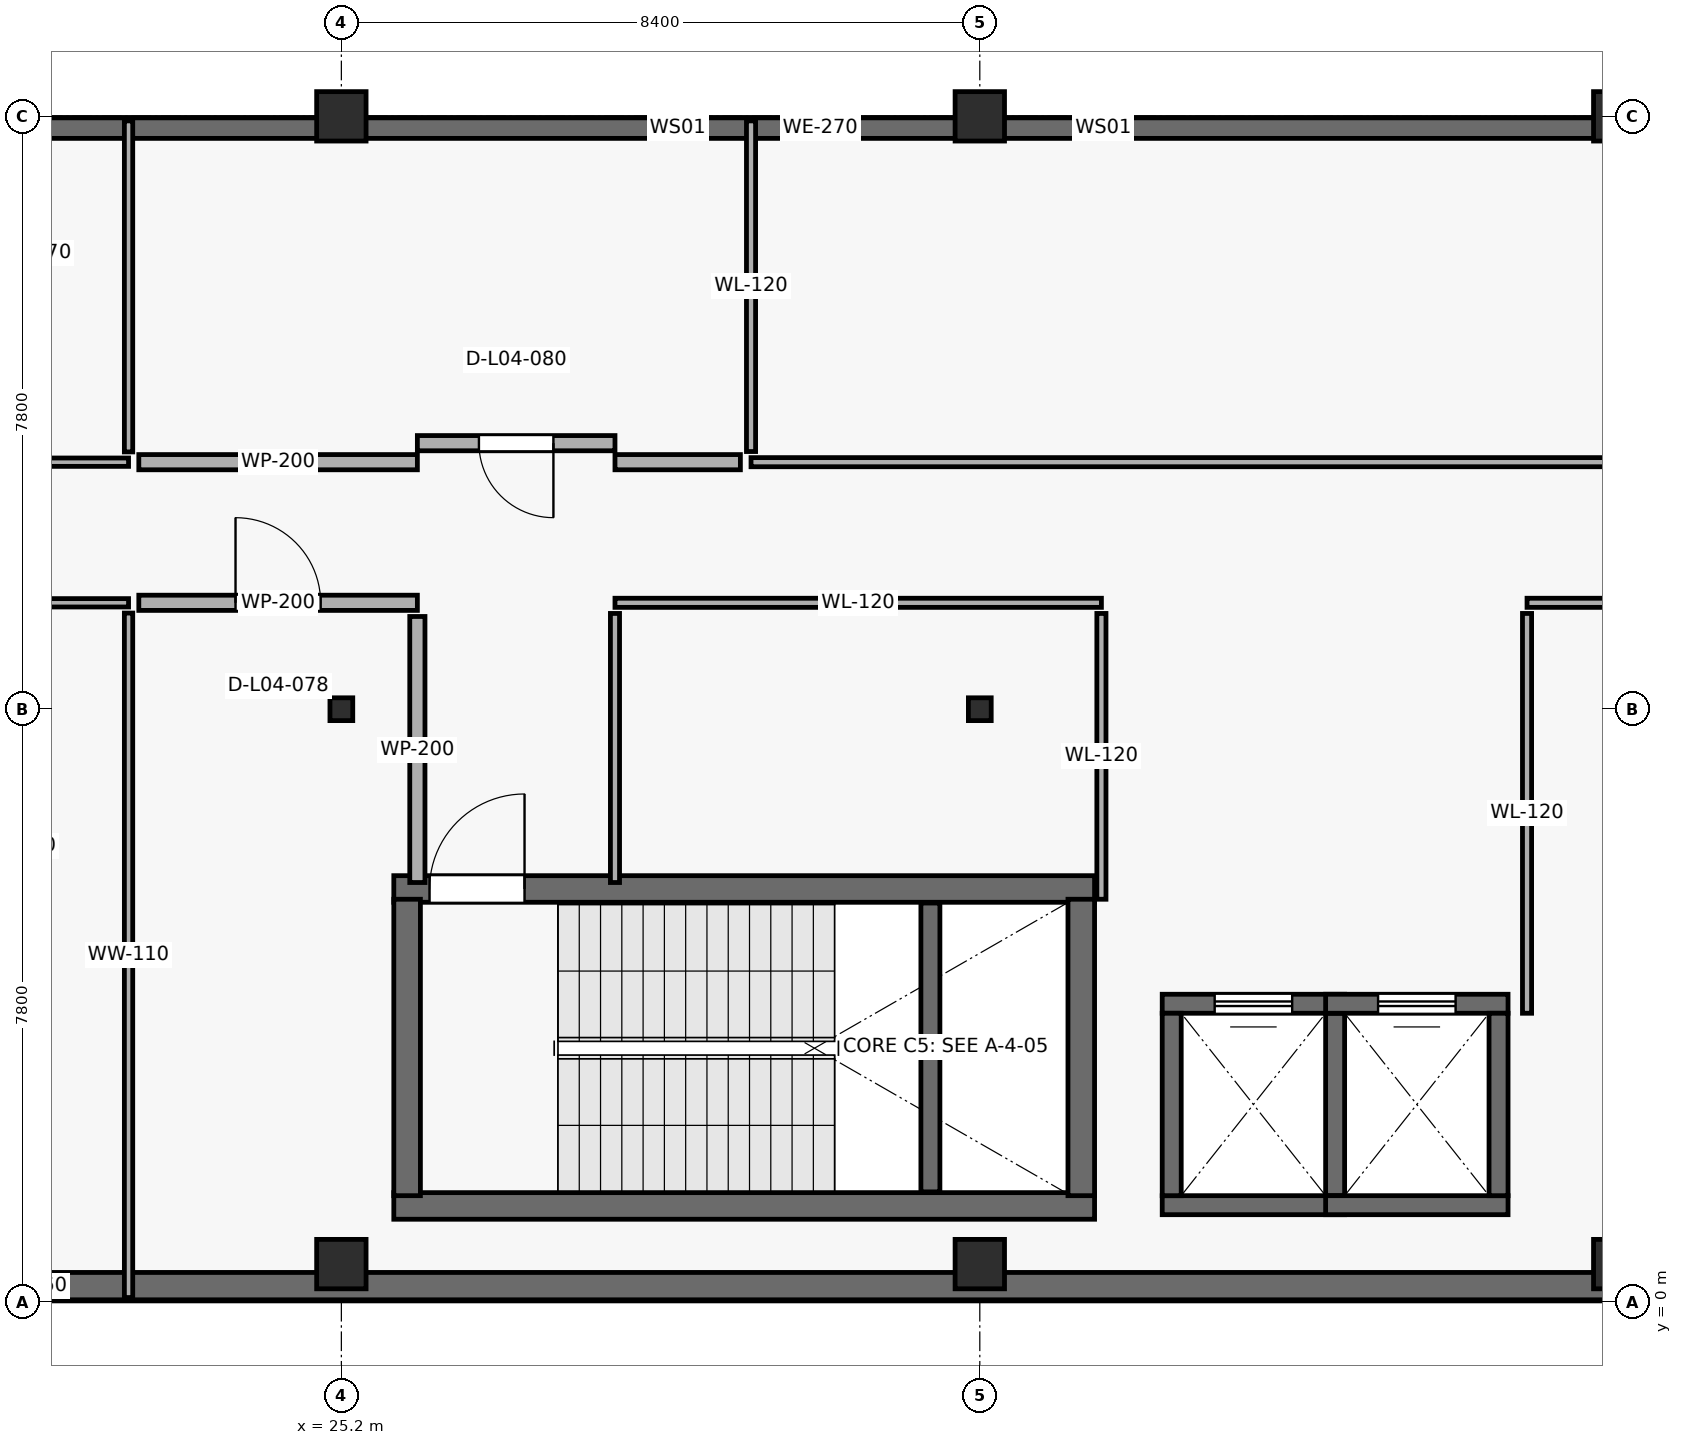
"""IFC4 building model, lengths in metres.
Left out: names, types, materials, properties, quantities, classifications, styles, units other than length and angle.
Written with IfcOpenShell. Run it as: python <this file> out.ifc"""

import sys

from ifc_helpers import new_model, si_unit, direction, frame, frame_2d, origin, origin_2d, place, context, subcontext, project, spatial, rectangle, hollow_rectangle, extrude, element, fill, save


model = new_model("IFC4")
c1 = context("Model", 3, precision=1e-05, world=origin(), true_north=direction((0.0, 1.0)))
c2 = subcontext(c1, "Body", "Model", "MODEL_VIEW")
j1 = project(units=[si_unit("LENGTHUNIT", "METRE"), si_unit("PLANEANGLEUNIT", "RADIAN")], contexts=[c1])
p1 = place(None, origin())
s1 = spatial("IfcSite", under=j1, at=p1, CompositionType="ELEMENT")
p2 = place(p1, origin())
s2 = spatial("IfcBuilding", under=s1, at=p2, CompositionType="ELEMENT")
p3 = place(p2, frame((0.0, 0.0, 15.3)))
s3 = spatial("IfcBuildingStorey", under=s2, at=p3, CompositionType="ELEMENT", Elevation=15.3)
p4 = place(p3, frame((25.2, 0.5, 0.0), z_axis=(0.0, 0.0, 1.0), x_axis=(1.0, 0.0, 0.0)))
e1 = element("IfcColumn", 1, at=p4, inside=s3, PredefinedType="COLUMN", context=c2, shape_type="SweptSolid", body=[
    extrude(rectangle(XDim=0.65, YDim=0.65, at=origin_2d()), origin(), (0.0, 0.0, 1.0), 5.1),
])
p5 = place(p3, frame((25.2, 7.8, 0.0), z_axis=(0.0, 0.0, 1.0), x_axis=(1.0, 0.0, 0.0)))
e2 = element("IfcColumn", 2, at=p5, inside=s3, PredefinedType="COLUMN", context=c2, shape_type="SweptSolid", body=[
    extrude(hollow_rectangle(XDim=0.3, YDim=0.3, WallThickness=0.012, at=origin_2d()), origin(), (0.0, 0.0, 1.0), 5.1),
])
for number, where, z_axis, x_axis in (
    (3, (25.2, 15.6, 0.0), (0.0, 0.0, 1.0), (1.0, 0.0, 0.0)),
    (4, (33.6, 0.5, 0.0), (0.0, 0.0, 1.0), (1.0, 0.0, 0.0)),
):
    element("IfcColumn", number, at=place(p3, frame(where, z_axis=z_axis, x_axis=x_axis)), inside=s3, PredefinedType="COLUMN", context=c2, shape_type="SweptSolid", body=[
        extrude(rectangle(XDim=0.65, YDim=0.65, at=origin_2d()), origin(), (0.0, 0.0, 1.0), 5.1),
    ])
p6 = place(p3, frame((33.6, 7.8, 0.0), z_axis=(0.0, 0.0, 1.0), x_axis=(1.0, 0.0, 0.0)))
e5 = element("IfcColumn", 5, at=p6, inside=s3, PredefinedType="COLUMN", context=c2, shape_type="SweptSolid", body=[
    extrude(hollow_rectangle(XDim=0.3, YDim=0.3, WallThickness=0.012, at=origin_2d()), origin(), (0.0, 0.0, 1.0), 5.1),
])
for number, where, z_axis, x_axis in (
    (6, (33.6, 15.6, 0.0), (0.0, 0.0, 1.0), (1.0, 0.0, 0.0)),
    (7, (42.0, 0.5, 0.0), (0.0, 0.0, 1.0), (1.0, 0.0, 0.0)),
    (8, (42.0, 15.6, 0.0), (0.0, 0.0, 1.0), (1.0, 0.0, 0.0)),
):
    element("IfcColumn", number, at=place(p3, frame(where, z_axis=z_axis, x_axis=x_axis)), inside=s3, PredefinedType="COLUMN", context=c2, shape_type="SweptSolid", body=[
        extrude(rectangle(XDim=0.65, YDim=0.65, at=origin_2d()), origin(), (0.0, 0.0, 1.0), 5.1),
    ])
p7 = place(p3, frame((21.0, 15.445, 0.0), z_axis=(0.0, 0.0, 1.0), x_axis=(1.0, 0.0, 0.0)))
e9 = element("IfcWall", 9, at=p7, inside=s3, PredefinedType="SOLIDWALL", context=c2, shape_type="SweptSolid", body=[
    extrude(rectangle(XDim=21.0, YDim=0.27, at=frame_2d((10.5, 0.0))), origin(), (0.0, 0.0, 1.0), 4.82),
])
p8 = place(p7, frame((8.4, 0.0, 1.85)))
e10 = element("IfcOpeningElement", 10, at=p8, cuts=e9, PredefinedType="OPENING", context=c2, shape_type="SweptSolid", body=[
    extrude(rectangle(XDim=0.45, YDim=1.1, at=frame_2d((0.225, 0.55))), frame((0.0, 0.145, 0.0), z_axis=(0.0, -1.0, 0.0), x_axis=(1.0, 0.0, 0.0)), (0.0, 0.0, 1.0), 0.29),
])
p9 = place(p7, frame((14.0, 0.0, 1.85)))
e11 = element("IfcOpeningElement", 11, at=p9, cuts=e9, PredefinedType="OPENING", context=c2, shape_type="SweptSolid", body=[
    extrude(rectangle(XDim=0.45, YDim=1.1, at=frame_2d((0.225, 0.55))), frame((0.0, 0.145, 0.0), z_axis=(0.0, -1.0, 0.0), x_axis=(1.0, 0.0, 0.0)), (0.0, 0.0, 1.0), 0.29),
])
p10 = place(p3, frame((42.0, 0.21, 0.0), z_axis=(0.0, 0.0, 1.0), x_axis=(-1.0, 0.0, 0.0)))
e12 = element("IfcWall", 12, at=p10, inside=s3, PredefinedType="SOLIDWALL", context=c2, shape_type="SweptSolid", body=[
    extrude(rectangle(XDim=41.79, YDim=0.36, at=frame_2d((20.895, 0.0))), origin(), (0.0, 0.0, 1.0), 4.82),
])
p11 = place(p3, frame((25.89, 1.265, 0.0), z_axis=(0.0, 0.0, 1.0), x_axis=(1.0, 0.0, 0.0)))
e13 = element("IfcWall", 13, at=p11, inside=s3, PredefinedType="SHEAR", context=c2, shape_type="SweptSolid", body=[
    extrude(rectangle(XDim=9.22, YDim=0.35, at=frame_2d((4.61, 0.0))), origin(), (0.0, 0.0, 1.0), 4.82),
])
p12 = place(p3, frame((35.11, 5.435, 0.0), z_axis=(0.0, 0.0, 1.0), x_axis=(-1.0, 0.0, 0.0)))
e14 = element("IfcWall", 14, at=p12, inside=s3, PredefinedType="SHEAR", context=c2, shape_type="SweptSolid", body=[
    extrude(rectangle(XDim=9.22, YDim=0.35, at=frame_2d((4.61, 0.0))), origin(), (0.0, 0.0, 1.0), 4.82),
])
p13 = place(p12, frame((7.5, 0.0, 0.0)))
e15 = element("IfcOpeningElement", 15, at=p13, cuts=e14, PredefinedType="OPENING", context=c2, shape_type="SweptSolid", body=[
    extrude(rectangle(XDim=1.25, YDim=2.2, at=frame_2d((0.625, 1.1))), frame((0.0, 0.185, 0.0), z_axis=(0.0, -1.0, 0.0), x_axis=(1.0, 0.0, 0.0)), (0.0, 0.0, 1.0), 0.37),
])
for number, where, z_axis, x_axis in (
    (16, (26.065, 1.4, 0.0), (0.0, 0.0, 1.0), (0.0, 1.0, 0.0)),
    (17, (34.935, 5.3, 0.0), (0.0, 0.0, 1.0), (0.0, -1.0, 0.0)),
):
    element("IfcWall", number, at=place(p3, frame(where, z_axis=z_axis, x_axis=x_axis)), inside=s3, PredefinedType="SHEAR", context=c2, shape_type="SweptSolid", body=[
        extrude(rectangle(XDim=3.9, YDim=0.35, at=frame_2d((1.95, 0.0))), origin(), (0.0, 0.0, 1.0), 4.82),
    ])
p14 = place(p3, frame((32.95, 1.45, 0.0), z_axis=(0.0, 0.0, 1.0), x_axis=(0.0, 1.0, 0.0)))
e18 = element("IfcWall", 18, at=p14, inside=s3, PredefinedType="SHEAR", context=c2, shape_type="SweptSolid", body=[
    extrude(rectangle(XDim=3.8, YDim=0.25, at=frame_2d((1.9, 0.0))), origin(), (0.0, 0.0, 1.0), 2.37),
])
p15 = place(p3, frame((36.0, 1.275, 0.0), z_axis=(0.0, 0.0, 1.0), x_axis=(1.0, 0.0, 0.0)))
e19 = element("IfcWall", 19, at=p15, inside=s3, PredefinedType="SHEAR", context=c2, shape_type="SweptSolid", body=[
    extrude(rectangle(XDim=2.4, YDim=0.25, at=frame_2d((1.2, 0.0))), origin(), (0.0, 0.0, 1.0), 4.82),
])
p16 = place(p3, frame((38.4, 3.925, 0.0), z_axis=(0.0, 0.0, 1.0), x_axis=(-1.0, 0.0, 0.0)))
e20 = element("IfcWall", 20, at=p16, inside=s3, PredefinedType="SHEAR", context=c2, shape_type="SweptSolid", body=[
    extrude(rectangle(XDim=2.4, YDim=0.25, at=frame_2d((1.2, 0.0))), origin(), (0.0, 0.0, 1.0), 4.82),
])
p17 = place(p16, frame((0.69, 0.0, 0.0)))
e21 = element("IfcOpeningElement", 21, at=p17, cuts=e20, PredefinedType="OPENING", context=c2, shape_type="SweptSolid", body=[
    extrude(rectangle(XDim=1.02, YDim=2.15, at=frame_2d((0.51, 1.075))), frame((0.0, 0.135, 0.0), z_axis=(0.0, -1.0, 0.0), x_axis=(1.0, 0.0, 0.0)), (0.0, 0.0, 1.0), 0.27),
])
for number, where, z_axis, x_axis in (
    (22, (36.125, 1.4, 0.0), (0.0, 0.0, 1.0), (0.0, 1.0, 0.0)),
    (23, (38.275, 3.8, 0.0), (0.0, 0.0, 1.0), (0.0, -1.0, 0.0)),
    (24, (38.15, 1.275, 0.0), (0.0, 0.0, 1.0), (1.0, 0.0, 0.0)),
):
    element("IfcWall", number, at=place(p3, frame(where, z_axis=z_axis, x_axis=x_axis)), inside=s3, PredefinedType="SHEAR", context=c2, shape_type="SweptSolid", body=[
        extrude(rectangle(XDim=2.4, YDim=0.25, at=frame_2d((1.2, 0.0))), origin(), (0.0, 0.0, 1.0), 4.82),
    ])
p18 = place(p3, frame((40.55, 3.925, 0.0), z_axis=(0.0, 0.0, 1.0), x_axis=(-1.0, 0.0, 0.0)))
e25 = element("IfcWall", 25, at=p18, inside=s3, PredefinedType="SHEAR", context=c2, shape_type="SweptSolid", body=[
    extrude(rectangle(XDim=2.4, YDim=0.25, at=frame_2d((1.2, 0.0))), origin(), (0.0, 0.0, 1.0), 4.82),
])
p19 = place(p18, frame((0.69, 0.0, 0.0)))
e26 = element("IfcOpeningElement", 26, at=p19, cuts=e25, PredefinedType="OPENING", context=c2, shape_type="SweptSolid", body=[
    extrude(rectangle(XDim=1.02, YDim=2.15, at=frame_2d((0.51, 1.075))), frame((0.0, 0.135, 0.0), z_axis=(0.0, -1.0, 0.0), x_axis=(1.0, 0.0, 0.0)), (0.0, 0.0, 1.0), 0.27),
])
p20 = place(p3, frame((40.425, 3.8, 0.0), z_axis=(0.0, 0.0, 1.0), x_axis=(0.0, -1.0, 0.0)))
e27 = element("IfcWall", 27, at=p20, inside=s3, PredefinedType="SHEAR", context=c2, shape_type="SweptSolid", body=[
    extrude(rectangle(XDim=2.4, YDim=0.25, at=frame_2d((1.2, 0.0))), origin(), (0.0, 0.0, 1.0), 4.82),
])
p21 = place(p3, frame((57.8, 11.05, 0.0), z_axis=(0.0, 0.0, 1.0), x_axis=(-1.0, 0.0, 0.0)))
e28 = element("IfcWall", 28, at=p21, inside=s3, PredefinedType="PARTITIONING", context=c2, shape_type="SweptSolid", body=[
    extrude(rectangle(XDim=27.21, YDim=0.12, at=frame_2d((13.605, 0.0))), origin(), (0.0, 0.0, 1.0), 4.0),
])
p22 = place(p21, frame((12.825, 0.0, 0.0)))
e29 = element("IfcOpeningElement", 29, at=p22, cuts=e28, PredefinedType="OPENING", context=c2, shape_type="SweptSolid", body=[
    extrude(rectangle(XDim=1.56, YDim=2.44, at=frame_2d((0.78, 1.22))), frame((0.0, 0.07, 0.0), z_axis=(0.0, -1.0, 0.0), x_axis=(1.0, 0.0, 0.0)), (0.0, 0.0, 1.0), 0.14),
])
p23 = place(p3, frame((4.8, 9.2, 0.0), z_axis=(0.0, 0.0, 1.0), x_axis=(1.0, 0.0, 0.0)))
e30 = element("IfcWall", 30, at=p23, inside=s3, PredefinedType="PARTITIONING", context=c2, shape_type="SweptSolid", body=[
    extrude(rectangle(XDim=17.6, YDim=0.11, at=frame_2d((8.8, 0.0))), origin(), (0.0, 0.0, 1.0), 4.82),
])
p24 = place(p3, frame((40.8, 9.2, 0.0), z_axis=(0.0, 0.0, 1.0), x_axis=(1.0, 0.0, 0.0)))
e31 = element("IfcWall", 31, at=p24, inside=s3, PredefinedType="PARTITIONING", context=c2, shape_type="SweptSolid", body=[
    extrude(rectangle(XDim=17.0, YDim=0.12, at=frame_2d((8.5, 0.0))), origin(), (0.0, 0.0, 1.0), 4.82),
])
p25 = place(p3, frame((22.4, 11.05, 0.0), z_axis=(0.0, 0.0, 1.0), x_axis=(-1.0, 0.0, 0.0)))
e32 = element("IfcWall", 32, at=p25, inside=s3, PredefinedType="PARTITIONING", context=c2, shape_type="SweptSolid", body=[
    extrude(rectangle(XDim=10.265, YDim=0.11, at=frame_2d((5.132, 0.0))), origin(), (0.0, 0.0, 1.0), 4.82),
])
p26 = place(p3, frame((22.4, 9.065, 0.0), z_axis=(0.0, 0.0, 1.0), x_axis=(0.0, -1.0, 0.0)))
e33 = element("IfcWall", 33, at=p26, inside=s3, PredefinedType="PARTITIONING", context=c2, shape_type="SweptSolid", body=[
    extrude(rectangle(XDim=9.005, YDim=0.11, at=frame_2d((4.502, 0.0))), origin(), (0.0, 0.0, 1.0), 4.82),
])
p27 = place(p3, frame((28.8, 9.2, 0.0), z_axis=(0.0, 0.0, 1.0), x_axis=(1.0, 0.0, 0.0)))
e34 = element("IfcWall", 34, at=p27, inside=s3, PredefinedType="PARTITIONING", context=c2, shape_type="SweptSolid", body=[
    extrude(rectangle(XDim=6.4, YDim=0.12, at=frame_2d((3.2, 0.0))), origin(), (0.0, 0.0, 1.0), 4.82),
])
p28 = place(p3, frame((40.8, 3.8, 0.0), z_axis=(0.0, 0.0, 1.0), x_axis=(0.0, 1.0, 0.0)))
e35 = element("IfcWall", 35, at=p28, inside=s3, PredefinedType="PARTITIONING", context=c2, shape_type="SweptSolid", body=[
    extrude(rectangle(XDim=5.26, YDim=0.12, at=frame_2d((2.63, 0.0))), origin(), (0.0, 0.0, 1.0), 4.82),
])
p29 = place(p3, frame((35.2, 9.06, 0.0), z_axis=(0.0, 0.0, 1.0), x_axis=(0.0, -1.0, 0.0)))
e36 = element("IfcWall", 36, at=p29, inside=s3, PredefinedType="PARTITIONING", context=c2, shape_type="SweptSolid", body=[
    extrude(rectangle(XDim=3.76, YDim=0.12, at=frame_2d((1.88, 0.0))), origin(), (0.0, 0.0, 1.0), 4.82),
])
p30 = place(p3, frame((22.4, 15.54, 0.0), z_axis=(0.0, 0.0, 1.0), x_axis=(0.0, -1.0, 0.0)))
e37 = element("IfcWall", 37, at=p30, inside=s3, PredefinedType="PARTITIONING", context=c2, shape_type="SweptSolid", body=[
    extrude(rectangle(XDim=4.355, YDim=0.11, at=frame_2d((2.177, 0.0))), origin(), (0.0, 0.0, 1.0), 4.82),
])
p31 = place(p3, frame((30.59, 11.19, 0.0), z_axis=(0.0, 0.0, 1.0), x_axis=(0.0, 1.0, 0.0)))
e38 = element("IfcWall", 38, at=p31, inside=s3, PredefinedType="PARTITIONING", context=c2, shape_type="SweptSolid", body=[
    extrude(rectangle(XDim=4.35, YDim=0.12, at=frame_2d((2.175, 0.0))), origin(), (0.0, 0.0, 1.0), 4.82),
])
p32 = place(p3, frame((22.535, 9.2, 0.0), z_axis=(0.0, 0.0, 1.0), x_axis=(1.0, 0.0, 0.0)))
e39 = element("IfcWall", 39, at=p32, inside=s3, PredefinedType="PARTITIONING", context=c2, shape_type="SweptSolid", body=[
    extrude(rectangle(XDim=3.665, YDim=0.2, at=frame_2d((1.833, 0.0))), origin(), (0.0, 0.0, 1.0), 4.82),
])
p33 = place(p32, frame((1.272, 0.0, 0.0)))
e40 = element("IfcOpeningElement", 40, at=p33, cuts=e39, PredefinedType="OPENING", context=c2, shape_type="SweptSolid", body=[
    extrude(rectangle(XDim=1.12, YDim=2.15, at=frame_2d((0.56, 1.075))), frame((0.0, 0.11, 0.0), z_axis=(0.0, -1.0, 0.0), x_axis=(1.0, 0.0, 0.0)), (0.0, 0.0, 1.0), 0.22),
])
p34 = place(p3, frame((26.2, 11.05, 0.0), z_axis=(0.0, 0.0, 1.0), x_axis=(-1.0, 0.0, 0.0)))
e41 = element("IfcWall", 41, at=p34, inside=s3, PredefinedType="PARTITIONING", context=c2, shape_type="SweptSolid", body=[
    extrude(rectangle(XDim=3.665, YDim=0.2, at=frame_2d((1.833, 0.0))), origin(), (0.0, 0.0, 1.0), 4.0),
])
p35 = place(p3, frame((26.2, 9.02, 0.0), z_axis=(0.0, 0.0, 1.0), x_axis=(0.0, -1.0, 0.0)))
e42 = element("IfcWall", 42, at=p35, inside=s3, PredefinedType="PARTITIONING", context=c2, shape_type="SweptSolid", body=[
    extrude(rectangle(XDim=3.5, YDim=0.2, at=frame_2d((1.75, 0.0))), origin(), (0.0, 0.0, 1.0), 4.82),
])
p36 = place(p3, frame((28.8, 5.52, 0.0), z_axis=(0.0, 0.0, 1.0), x_axis=(0.0, 1.0, 0.0)))
e43 = element("IfcWall", 43, at=p36, inside=s3, PredefinedType="PARTITIONING", context=c2, shape_type="SweptSolid", body=[
    extrude(rectangle(XDim=3.54, YDim=0.12, at=frame_2d((1.77, 0.0))), origin(), (0.0, 0.0, 1.0), 4.82),
])
p37 = place(p3, frame((28.8, 11.3, 0.0), z_axis=(0.0, 0.0, 1.0), x_axis=(-1.0, 0.0, 0.0)))
e44 = element("IfcWall", 44, at=p37, inside=s3, PredefinedType="PARTITIONING", context=c2, shape_type="SweptSolid", body=[
    extrude(rectangle(XDim=2.6, YDim=0.2, at=frame_2d((1.3, 0.0))), origin(), (0.0, 0.0, 1.0), 4.0),
])
p38 = place(p37, frame((0.81, 0.0, 0.0)))
e45 = element("IfcOpeningElement", 45, at=p38, cuts=e44, PredefinedType="OPENING", context=c2, shape_type="SweptSolid", body=[
    extrude(rectangle(XDim=0.98, YDim=2.12, at=frame_2d((0.49, 1.06))), frame((0.0, 0.11, 0.0), z_axis=(0.0, -1.0, 0.0), x_axis=(1.0, 0.0, 0.0)), (0.0, 0.0, 1.0), 0.22),
])
p39 = place(p3, frame((30.45, 11.05, 0.0), z_axis=(0.0, 0.0, 1.0), x_axis=(-1.0, 0.0, 0.0)))
e46 = element("IfcWall", 46, at=p39, inside=s3, PredefinedType="PARTITIONING", context=c2, shape_type="SweptSolid", body=[
    extrude(rectangle(XDim=1.65, YDim=0.2, at=frame_2d((0.825, 0.0))), origin(), (0.0, 0.0, 1.0), 4.0),
])
p40 = place(p8, origin())
e47 = element("IfcWindow", 47, at=p40, inside=s3, PartitioningType="SINGLE_PANEL", PredefinedType="WINDOW", context=c2, shape_type="SweptSolid", body=[
    extrude(rectangle(XDim=0.45, YDim=1.1, at=frame_2d((0.225, 0.55))), frame((0.0, 0.03, 0.0), z_axis=(0.0, -1.0, 0.0), x_axis=(1.0, 0.0, 0.0)), (0.0, 0.0, 1.0), 0.06),
])
fill(e10, e47)
p41 = place(p9, origin())
e48 = element("IfcWindow", 48, at=p41, inside=s3, PartitioningType="SINGLE_PANEL", PredefinedType="WINDOW", context=c2, shape_type="SweptSolid", body=[
    extrude(rectangle(XDim=0.45, YDim=1.1, at=frame_2d((0.225, 0.55))), frame((0.0, 0.03, 0.0), z_axis=(0.0, -1.0, 0.0), x_axis=(1.0, 0.0, 0.0)), (0.0, 0.0, 1.0), 0.06),
])
fill(e11, e48)
p42 = place(p13, origin())
e49 = element("IfcDoor", 49, at=p42, inside=s3, OperationType="SINGLE_SWING_RIGHT", PredefinedType="DOOR", context=c2, shape_type="SweptSolid", body=[
    extrude(rectangle(XDim=1.25, YDim=2.2, at=frame_2d((0.625, 1.1))), frame((0.0, 0.025, 0.0), z_axis=(0.0, -1.0, 0.0), x_axis=(1.0, 0.0, 0.0)), (0.0, 0.0, 1.0), 0.05),
])
fill(e15, e49)
p43 = place(p17, origin())
e50 = element("IfcDoor", 50, at=p43, inside=s3, OperationType="SLIDING_TO_LEFT", PredefinedType="DOOR", context=c2, shape_type="SweptSolid", body=[
    extrude(rectangle(XDim=1.02, YDim=2.15, at=frame_2d((0.51, 1.075))), frame((0.0, 0.025, 0.0), z_axis=(0.0, -1.0, 0.0), x_axis=(1.0, 0.0, 0.0)), (0.0, 0.0, 1.0), 0.05),
])
fill(e21, e50)
p44 = place(p19, origin())
e51 = element("IfcDoor", 51, at=p44, inside=s3, OperationType="SLIDING_TO_LEFT", PredefinedType="DOOR", context=c2, shape_type="SweptSolid", body=[
    extrude(rectangle(XDim=1.02, YDim=2.15, at=frame_2d((0.51, 1.075))), frame((0.0, 0.025, 0.0), z_axis=(0.0, -1.0, 0.0), x_axis=(1.0, 0.0, 0.0)), (0.0, 0.0, 1.0), 0.05),
])
fill(e26, e51)
p45 = place(p33, origin())
e52 = element("IfcDoor", 52, at=p45, inside=s3, OperationType="SINGLE_SWING_LEFT", PredefinedType="DOOR", context=c2, shape_type="SweptSolid", body=[
    extrude(rectangle(XDim=1.12, YDim=2.15, at=frame_2d((0.56, 1.075))), frame((0.0, 0.025, 0.0), z_axis=(0.0, -1.0, 0.0), x_axis=(1.0, 0.0, 0.0)), (0.0, 0.0, 1.0), 0.05),
])
fill(e40, e52)
p46 = place(p38, origin())
e53 = element("IfcDoor", 53, at=p46, inside=s3, OperationType="SINGLE_SWING_LEFT", PredefinedType="DOOR", context=c2, shape_type="SweptSolid", body=[
    extrude(rectangle(XDim=0.98, YDim=2.12, at=frame_2d((0.49, 1.06))), frame((0.0, 0.025, 0.0), z_axis=(0.0, -1.0, 0.0), x_axis=(1.0, 0.0, 0.0)), (0.0, 0.0, 1.0), 0.05),
])
fill(e45, e53)
save(model, sys.argv[1])
